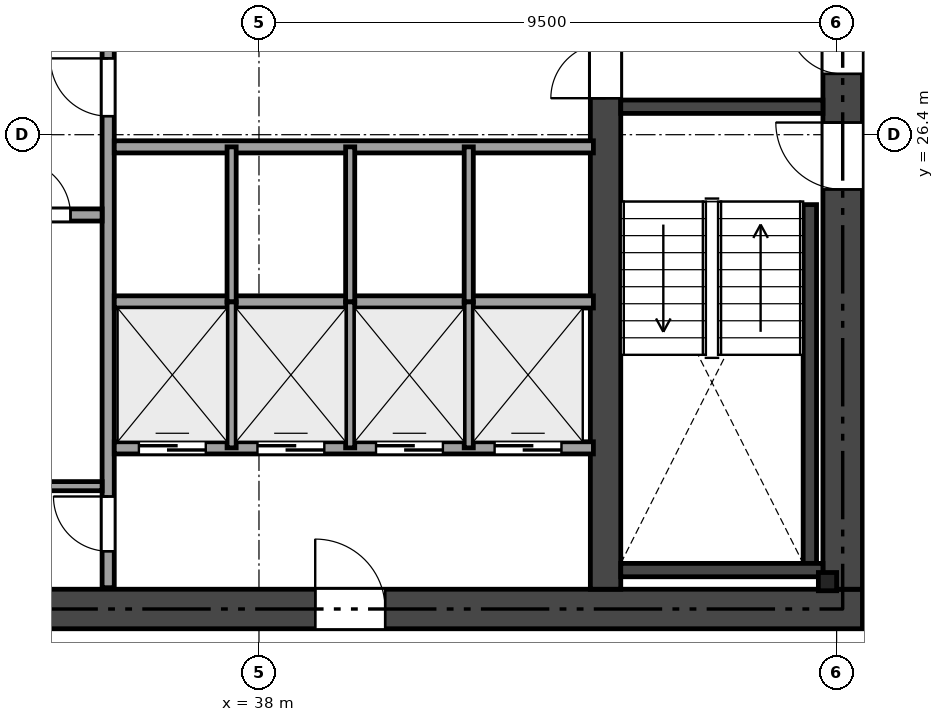
"""IFC4 building model, lengths in metres.
Left out: names, types, materials, properties, quantities, classifications, styles, units other than length and angle.
Written with IfcOpenShell. Run it as: python <this file> out.ifc"""

import sys

from ifc_helpers import new_model, si_unit, direction, frame, frame_2d, origin, origin_2d, place, context, subcontext, project, spatial, rectangle, i_section, extrude, element, fill, save


model = new_model("IFC4")
c1 = context("Model", 3, precision=1e-05, world=origin(), true_north=direction((0.0, 1.0)))
c2 = subcontext(c1, "Body", "Model", "MODEL_VIEW")
j1 = project(units=[si_unit("LENGTHUNIT", "METRE"), si_unit("PLANEANGLEUNIT", "RADIAN")], contexts=[c1])
p1 = place(None, origin())
s1 = spatial("IfcSite", under=j1, at=p1, CompositionType="ELEMENT")
p2 = place(p1, origin())
s2 = spatial("IfcBuilding", under=s1, at=p2, CompositionType="ELEMENT")
p3 = place(p2, frame((0.0, 0.0, 54.6)))
s3 = spatial("IfcBuildingStorey", under=s2, at=p3, CompositionType="ELEMENT", Elevation=54.6)
p4 = place(p3, frame((26.475, 18.6, 0.0), z_axis=(0.0, 0.0, 1.0), x_axis=(1.0, 0.0, 0.0)))
e1 = element("IfcWall", 1, at=p4, inside=s3, PredefinedType="SHEAR", context=c2, shape_type="SweptSolid", body=[
    extrude(rectangle(XDim=21.45, YDim=0.65, at=frame_2d((10.725, 0.0))), origin(), (0.0, 0.0, 1.0), 3.17),
])
p5 = place(p4, frame((12.45, 0.0, 0.0)))
e2 = element("IfcOpeningElement", 2, at=p5, cuts=e1, PredefinedType="OPENING", context=c2, shape_type="SweptSolid", body=[
    extrude(rectangle(XDim=1.15, YDim=2.15, at=frame_2d((0.575, 1.075))), frame((0.0, 0.335, 0.0), z_axis=(0.0, -1.0, 0.0), x_axis=(1.0, 0.0, 0.0)), (0.0, 0.0, 1.0), 0.67),
])
p6 = place(p4, frame((5.275, 0.0, 0.0)))
e3 = element("IfcOpeningElement", 3, at=p6, cuts=e1, PredefinedType="OPENING", context=c2, shape_type="SweptSolid", body=[
    extrude(rectangle(XDim=0.9, YDim=2.1, at=frame_2d((0.45, 1.05))), frame((0.0, 0.335, 0.0), z_axis=(0.0, -1.0, 0.0), x_axis=(1.0, 0.0, 0.0)), (0.0, 0.0, 1.0), 0.67),
])
p7 = place(p3, frame((47.6, 18.925, 0.0), z_axis=(0.0, 0.0, 1.0), x_axis=(0.0, 1.0, 0.0)))
e4 = element("IfcWall", 4, at=p7, inside=s3, PredefinedType="SHEAR", context=c2, shape_type="SweptSolid", body=[
    extrude(rectangle(XDim=14.95, YDim=0.65, at=frame_2d((7.475, 0.0))), origin(), (0.0, 0.0, 1.0), 3.17),
])
p8 = place(p7, frame((6.575, 0.0, 0.0)))
e5 = element("IfcOpeningElement", 5, at=p8, cuts=e4, PredefinedType="OPENING", context=c2, shape_type="SweptSolid", body=[
    extrude(rectangle(XDim=1.1, YDim=2.15, at=frame_2d((0.55, 1.075))), frame((0.0, 0.335, 0.0), z_axis=(0.0, -1.0, 0.0), x_axis=(1.0, 0.0, 0.0)), (0.0, 0.0, 1.0), 0.67),
])
p9 = place(p7, frame((8.475, 0.0, 0.0)))
e6 = element("IfcOpeningElement", 6, at=p9, cuts=e4, PredefinedType="OPENING", context=c2, shape_type="SweptSolid", body=[
    extrude(rectangle(XDim=0.9, YDim=2.1, at=frame_2d((0.45, 1.05))), frame((0.0, 0.335, 0.0), z_axis=(0.0, -1.0, 0.0), x_axis=(1.0, 0.0, 0.0)), (0.0, 0.0, 1.0), 0.67),
])
p10 = place(p7, frame((13.125, 0.0, 0.0)))
e7 = element("IfcOpeningElement", 7, at=p10, cuts=e4, PredefinedType="OPENING", context=c2, shape_type="SweptSolid", body=[
    extrude(rectangle(XDim=0.9, YDim=2.1, at=frame_2d((0.45, 1.05))), frame((0.0, 0.335, 0.0), z_axis=(0.0, -1.0, 0.0), x_axis=(1.0, 0.0, 0.0)), (0.0, 0.0, 1.0), 0.67),
])
p11 = place(p3, frame((43.7, 18.925, 0.0), z_axis=(0.0, 0.0, 1.0), x_axis=(0.0, 1.0, 0.0)))
e8 = element("IfcWall", 8, at=p11, inside=s3, PredefinedType="SHEAR", context=c2, shape_type="SweptSolid", body=[
    extrude(rectangle(XDim=14.95, YDim=0.5, at=frame_2d((7.475, 0.0))), origin(), (0.0, 0.0, 1.0), 3.17),
])
p12 = place(p11, frame((8.075, 0.0, 0.0)))
e9 = element("IfcOpeningElement", 9, at=p12, cuts=e8, PredefinedType="OPENING", context=c2, shape_type="SweptSolid", body=[
    extrude(rectangle(XDim=0.9, YDim=2.1, at=frame_2d((0.45, 1.05))), frame((0.0, 0.26, 0.0), z_axis=(0.0, -1.0, 0.0), x_axis=(1.0, 0.0, 0.0)), (0.0, 0.0, 1.0), 0.52),
])
p13 = place(p3, frame((43.95, 26.86, 0.0), z_axis=(0.0, 0.0, 1.0), x_axis=(1.0, 0.0, 0.0)))
e10 = element("IfcWall", 10, at=p13, inside=s3, PredefinedType="SHEAR", context=c2, shape_type="SweptSolid", body=[
    extrude(rectangle(XDim=3.325, YDim=0.22, at=frame_2d((1.663, 0.0))), origin(), (0.0, 0.0, 1.0), 3.17),
])
p14 = place(p3, frame((47.06, 19.35, 0.0), z_axis=(0.0, 0.0, 1.0), x_axis=(0.0, 1.0, 0.0)))
e11 = element("IfcWall", 11, at=p14, inside=s3, PredefinedType="SHEAR", context=c2, shape_type="SweptSolid", body=[
    extrude(rectangle(XDim=5.9, YDim=0.22, at=frame_2d((2.95, 0.0))), origin(), (0.0, 0.0, 1.0), 3.17),
])
p15 = place(p3, frame((43.95, 19.24, 0.0), z_axis=(0.0, 0.0, 1.0), x_axis=(1.0, 0.0, 0.0)))
e12 = element("IfcWall", 12, at=p15, inside=s3, PredefinedType="SHEAR", context=c2, shape_type="SweptSolid", body=[
    extrude(rectangle(XDim=3.325, YDim=0.22, at=frame_2d((1.663, 0.0))), origin(), (0.0, 0.0, 1.0), 3.17),
])
p16 = place(p3, frame((47.35, 19.05, 0.0), z_axis=(0.0, 0.0, 1.0), x_axis=(1.0, 0.0, 0.0)))
e13 = element("IfcColumn", 13, at=p16, inside=s3, PredefinedType="PILASTER", context=c2, shape_type="SweptSolid", body=[
    extrude(i_section(OverallWidth=0.3, OverallDepth=0.3, WebThickness=0.011, FlangeThickness=0.019, at=origin_2d()), origin(), (0.0, 0.0, 1.0), 3.17),
])
p17 = place(p3, frame((35.52, 18.95, 0.0), z_axis=(0.0, 0.0, 1.0), x_axis=(0.0, 1.0, 0.0)))
e14 = element("IfcWall", 14, at=p17, inside=s3, PredefinedType="SOLIDWALL", context=c2, shape_type="SweptSolid", body=[
    extrude(rectangle(XDim=14.9, YDim=0.2, at=frame_2d((7.45, 0.0))), origin(), (0.0, 0.0, 1.0), 2.691),
])
p18 = place(p17, frame((7.755, 0.0, 0.0)))
e15 = element("IfcOpeningElement", 15, at=p18, cuts=e14, PredefinedType="OPENING", context=c2, shape_type="SweptSolid", body=[
    extrude(rectangle(XDim=0.95, YDim=2.15, at=frame_2d((0.475, 1.075))), frame((0.0, 0.11, 0.0), z_axis=(0.0, -1.0, 0.0), x_axis=(1.0, 0.0, 0.0)), (0.0, 0.0, 1.0), 0.22),
])
p19 = place(p17, frame((0.6, 0.0, 0.0)))
e16 = element("IfcOpeningElement", 16, at=p19, cuts=e14, PredefinedType="OPENING", context=c2, shape_type="SweptSolid", body=[
    extrude(rectangle(XDim=0.9, YDim=2.1, at=frame_2d((0.45, 1.05))), frame((0.0, 0.11, 0.0), z_axis=(0.0, -1.0, 0.0), x_axis=(1.0, 0.0, 0.0)), (0.0, 0.0, 1.0), 0.22),
])
p20 = place(p3, frame((31.0, 25.08, 0.0), z_axis=(0.0, 0.0, 1.0), x_axis=(1.0, 0.0, 0.0)))
e17 = element("IfcWall", 17, at=p20, inside=s3, PredefinedType="SOLIDWALL", context=c2, shape_type="SweptSolid", body=[
    extrude(rectangle(XDim=4.42, YDim=0.2, at=frame_2d((2.21, 0.0))), origin(), (0.0, 0.0, 1.0), 3.17),
])
p21 = place(p20, frame((3.0, 0.0, 0.0)))
e18 = element("IfcOpeningElement", 18, at=p21, cuts=e17, PredefinedType="OPENING", context=c2, shape_type="SweptSolid", body=[
    extrude(rectangle(XDim=0.9, YDim=2.1, at=frame_2d((0.45, 1.05))), frame((0.0, 0.11, 0.0), z_axis=(0.0, -1.0, 0.0), x_axis=(1.0, 0.0, 0.0)), (0.0, 0.0, 1.0), 0.22),
])
p22 = place(p20, frame((0.62, 0.0, 0.0)))
e19 = element("IfcOpeningElement", 19, at=p22, cuts=e17, PredefinedType="OPENING", context=c2, shape_type="SweptSolid", body=[
    extrude(rectangle(XDim=1.2, YDim=2.15, at=frame_2d((0.6, 1.075))), frame((0.0, 0.11, 0.0), z_axis=(0.0, -1.0, 0.0), x_axis=(1.0, 0.0, 0.0)), (0.0, 0.0, 1.0), 0.22),
])
p23 = place(p3, frame((33.42, 20.62, 0.0), z_axis=(0.0, 0.0, 1.0), x_axis=(1.0, 0.0, 0.0)))
e20 = element("IfcWall", 20, at=p23, inside=s3, PredefinedType="PARTITIONING", context=c2, shape_type="SweptSolid", body=[
    extrude(rectangle(XDim=2.0, YDim=0.15, at=frame_2d((1.0, 0.0))), origin(), (0.0, 0.0, 1.0), 3.17),
])
p24 = place(p3, frame((35.62, 26.2, 0.0), z_axis=(0.0, 0.0, 1.0), x_axis=(1.0, 0.0, 0.0)))
e21 = element("IfcWall", 21, at=p24, inside=s3, PredefinedType="SOLIDWALL", context=c2, shape_type="SweptSolid", body=[
    extrude(rectangle(XDim=7.88, YDim=0.2, at=frame_2d((3.94, 0.0))), origin(), (0.0, 0.0, 1.0), 3.17),
])
p25 = place(p3, frame((35.62, 23.65, 0.0), z_axis=(0.0, 0.0, 1.0), x_axis=(1.0, 0.0, 0.0)))
e22 = element("IfcWall", 22, at=p25, inside=s3, PredefinedType="SOLIDWALL", context=c2, shape_type="SweptSolid", body=[
    extrude(rectangle(XDim=7.88, YDim=0.2, at=frame_2d((3.94, 0.0))), origin(), (0.0, 0.0, 1.0), 2.691),
])
p26 = place(p3, frame((35.62, 21.25, 0.0), z_axis=(0.0, 0.0, 1.0), x_axis=(1.0, 0.0, 0.0)))
e23 = element("IfcWall", 23, at=p26, inside=s3, PredefinedType="SOLIDWALL", context=c2, shape_type="SweptSolid", body=[
    extrude(rectangle(XDim=7.88, YDim=0.2, at=frame_2d((3.94, 0.0))), origin(), (0.0, 0.0, 1.0), 3.17),
])
p27 = place(p26, frame((0.405, 0.0, 0.0)))
e24 = element("IfcOpeningElement", 24, at=p27, cuts=e23, PredefinedType="OPENING", context=c2, shape_type="SweptSolid", body=[
    extrude(rectangle(XDim=1.1, YDim=2.15, at=frame_2d((0.55, 1.075))), frame((0.0, 0.11, 0.0), z_axis=(0.0, -1.0, 0.0), x_axis=(1.0, 0.0, 0.0)), (0.0, 0.0, 1.0), 0.22),
])
p28 = place(p26, frame((2.355, 0.0, 0.0)))
e25 = element("IfcOpeningElement", 25, at=p28, cuts=e23, PredefinedType="OPENING", context=c2, shape_type="SweptSolid", body=[
    extrude(rectangle(XDim=1.1, YDim=2.15, at=frame_2d((0.55, 1.075))), frame((0.0, 0.11, 0.0), z_axis=(0.0, -1.0, 0.0), x_axis=(1.0, 0.0, 0.0)), (0.0, 0.0, 1.0), 0.22),
])
p29 = place(p26, frame((4.305, 0.0, 0.0)))
e26 = element("IfcOpeningElement", 26, at=p29, cuts=e23, PredefinedType="OPENING", context=c2, shape_type="SweptSolid", body=[
    extrude(rectangle(XDim=1.1, YDim=2.15, at=frame_2d((0.55, 1.075))), frame((0.0, 0.11, 0.0), z_axis=(0.0, -1.0, 0.0), x_axis=(1.0, 0.0, 0.0)), (0.0, 0.0, 1.0), 0.22),
])
p30 = place(p26, frame((6.255, 0.0, 0.0)))
e27 = element("IfcOpeningElement", 27, at=p30, cuts=e23, PredefinedType="OPENING", context=c2, shape_type="SweptSolid", body=[
    extrude(rectangle(XDim=1.1, YDim=2.15, at=frame_2d((0.55, 1.075))), frame((0.0, 0.11, 0.0), z_axis=(0.0, -1.0, 0.0), x_axis=(1.0, 0.0, 0.0)), (0.0, 0.0, 1.0), 0.22),
])
for number, where, z_axis, x_axis in (
    (28, (37.55, 23.65, 0.0), (0.0, 0.0, 1.0), (0.0, 1.0, 0.0)),
    (29, (39.5, 23.65, 0.0), (0.0, 0.0, 1.0), (0.0, 1.0, 0.0)),
    (30, (41.45, 23.65, 0.0), (0.0, 0.0, 1.0), (0.0, 1.0, 0.0)),
):
    element("IfcWall", number, at=place(p3, frame(where, z_axis=z_axis, x_axis=x_axis)), inside=s3, PredefinedType="PARTITIONING", context=c2, shape_type="SweptSolid", body=[
        extrude(rectangle(XDim=2.55, YDim=0.15, at=frame_2d((1.275, 0.0))), origin(), (0.0, 0.0, 1.0), 2.691),
    ])
for number, where, z_axis, x_axis in (
    (31, (37.55, 21.25, 0.0), (0.0, 0.0, 1.0), (0.0, 1.0, 0.0)),
    (32, (39.5, 21.25, 0.0), (0.0, 0.0, 1.0), (0.0, 1.0, 0.0)),
    (33, (41.45, 21.25, 0.0), (0.0, 0.0, 1.0), (0.0, 1.0, 0.0)),
):
    element("IfcWall", number, at=place(p3, frame(where, z_axis=z_axis, x_axis=x_axis)), inside=s3, PredefinedType="PARTITIONING", context=c2, shape_type="SweptSolid", body=[
        extrude(rectangle(XDim=2.4, YDim=0.15, at=frame_2d((1.2, 0.0))), origin(), (0.0, 0.0, 1.0), 2.691),
    ])
p31 = place(p8, origin())
e34 = element("IfcDoor", 34, at=p31, inside=s3, OperationType="SINGLE_SWING_RIGHT", PredefinedType="DOOR", context=c2, shape_type="SweptSolid", body=[
    extrude(rectangle(XDim=1.1, YDim=2.15, at=frame_2d((0.55, 1.075))), frame((0.0, 0.025, 0.0), z_axis=(0.0, -1.0, 0.0), x_axis=(1.0, 0.0, 0.0)), (0.0, 0.0, 1.0), 0.05),
])
fill(e5, e34)
p32 = place(p18, origin())
e35 = element("IfcDoor", 35, at=p32, inside=s3, OperationType="SINGLE_SWING_RIGHT", PredefinedType="DOOR", context=c2, shape_type="SweptSolid", body=[
    extrude(rectangle(XDim=0.95, YDim=2.15, at=frame_2d((0.475, 1.075))), frame((0.0, 0.025, 0.0), z_axis=(0.0, -1.0, 0.0), x_axis=(1.0, 0.0, 0.0)), (0.0, 0.0, 1.0), 0.05),
])
fill(e15, e35)
p33 = place(p12, origin())
e36 = element("IfcDoor", 36, at=p33, inside=s3, OperationType="SINGLE_SWING_LEFT", PredefinedType="DOOR", context=c2, shape_type="SweptSolid", body=[
    extrude(rectangle(XDim=0.9, YDim=2.1, at=frame_2d((0.45, 1.05))), frame((0.0, 0.025, 0.0), z_axis=(0.0, -1.0, 0.0), x_axis=(1.0, 0.0, 0.0)), (0.0, 0.0, 1.0), 0.05),
])
fill(e9, e36)
p34 = place(p9, origin())
e37 = element("IfcDoor", 37, at=p34, inside=s3, OperationType="SINGLE_SWING_RIGHT", PredefinedType="DOOR", context=c2, shape_type="SweptSolid", body=[
    extrude(rectangle(XDim=0.9, YDim=2.1, at=frame_2d((0.45, 1.05))), frame((0.0, 0.025, 0.0), z_axis=(0.0, -1.0, 0.0), x_axis=(1.0, 0.0, 0.0)), (0.0, 0.0, 1.0), 0.05),
])
fill(e6, e37)
p35 = place(p5, origin())
e38 = element("IfcDoor", 38, at=p35, inside=s3, OperationType="SINGLE_SWING_LEFT", PredefinedType="DOOR", context=c2, shape_type="SweptSolid", body=[
    extrude(rectangle(XDim=1.15, YDim=2.15, at=frame_2d((0.575, 1.075))), frame((0.0, 0.025, 0.0), z_axis=(0.0, -1.0, 0.0), x_axis=(1.0, 0.0, 0.0)), (0.0, 0.0, 1.0), 0.05),
])
fill(e2, e38)
p36 = place(p19, origin())
e39 = element("IfcDoor", 39, at=p36, inside=s3, OperationType="SINGLE_SWING_RIGHT", PredefinedType="DOOR", context=c2, shape_type="SweptSolid", body=[
    extrude(rectangle(XDim=0.9, YDim=2.1, at=frame_2d((0.45, 1.05))), frame((0.0, 0.025, 0.0), z_axis=(0.0, -1.0, 0.0), x_axis=(1.0, 0.0, 0.0)), (0.0, 0.0, 1.0), 0.05),
])
fill(e16, e39)
p37 = place(p21, origin())
e40 = element("IfcDoor", 40, at=p37, inside=s3, OperationType="SINGLE_SWING_LEFT", PredefinedType="DOOR", context=c2, shape_type="SweptSolid", body=[
    extrude(rectangle(XDim=0.9, YDim=2.1, at=frame_2d((0.45, 1.05))), frame((0.0, 0.025, 0.0), z_axis=(0.0, -1.0, 0.0), x_axis=(1.0, 0.0, 0.0)), (0.0, 0.0, 1.0), 0.05),
])
fill(e18, e40)
p38 = place(p27, origin())
e41 = element("IfcDoor", 41, at=p38, inside=s3, OperationType="SLIDING_TO_LEFT", PredefinedType="DOOR", context=c2, shape_type="SweptSolid", body=[
    extrude(rectangle(XDim=1.1, YDim=2.15, at=frame_2d((0.55, 1.075))), frame((0.0, 0.025, 0.0), z_axis=(0.0, -1.0, 0.0), x_axis=(1.0, 0.0, 0.0)), (0.0, 0.0, 1.0), 0.05),
])
fill(e24, e41)
p39 = place(p28, origin())
e42 = element("IfcDoor", 42, at=p39, inside=s3, OperationType="SLIDING_TO_LEFT", PredefinedType="DOOR", context=c2, shape_type="SweptSolid", body=[
    extrude(rectangle(XDim=1.1, YDim=2.15, at=frame_2d((0.55, 1.075))), frame((0.0, 0.025, 0.0), z_axis=(0.0, -1.0, 0.0), x_axis=(1.0, 0.0, 0.0)), (0.0, 0.0, 1.0), 0.05),
])
fill(e25, e42)
p40 = place(p29, origin())
e43 = element("IfcDoor", 43, at=p40, inside=s3, OperationType="SLIDING_TO_LEFT", PredefinedType="DOOR", context=c2, shape_type="SweptSolid", body=[
    extrude(rectangle(XDim=1.1, YDim=2.15, at=frame_2d((0.55, 1.075))), frame((0.0, 0.025, 0.0), z_axis=(0.0, -1.0, 0.0), x_axis=(1.0, 0.0, 0.0)), (0.0, 0.0, 1.0), 0.05),
])
fill(e26, e43)
p41 = place(p30, origin())
e44 = element("IfcDoor", 44, at=p41, inside=s3, OperationType="SLIDING_TO_LEFT", PredefinedType="DOOR", context=c2, shape_type="SweptSolid", body=[
    extrude(rectangle(XDim=1.1, YDim=2.15, at=frame_2d((0.55, 1.075))), frame((0.0, 0.025, 0.0), z_axis=(0.0, -1.0, 0.0), x_axis=(1.0, 0.0, 0.0)), (0.0, 0.0, 1.0), 0.05),
])
fill(e27, e44)
save(model, sys.argv[1])
